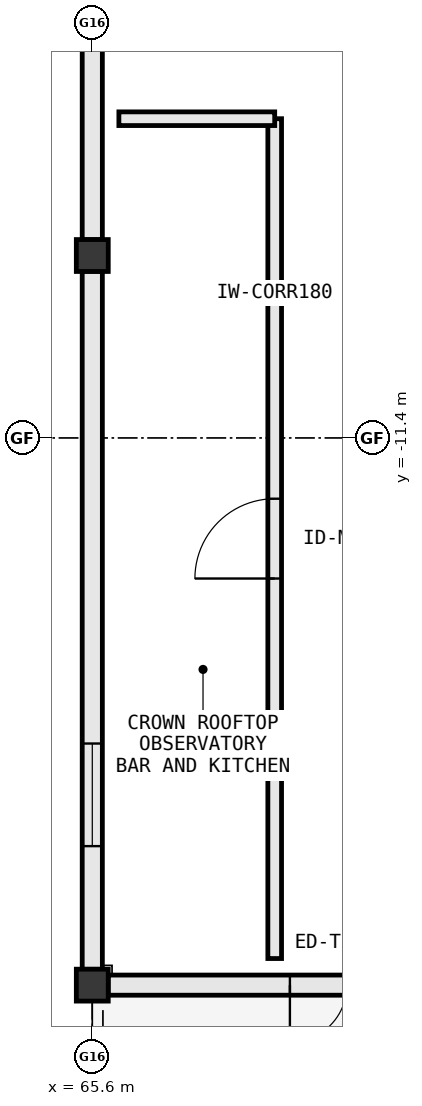
"""IFC4 building model, lengths in metres.
Left out: names, types, materials, properties, quantities, classifications, styles, units other than length and angle.
Written with IfcOpenShell. Run it as: python <this file> out.ifc"""

import sys

from ifc_helpers import new_model, si_unit, direction, frame, frame_2d, origin, origin_2d, place, context, subcontext, project, spatial, rectangle, extrude, element, fill, save


model = new_model("IFC4")
c1 = context("Model", 3, precision=1e-05, world=origin(), true_north=direction((0.0, 1.0)))
c2 = subcontext(c1, "Body", "Model", "MODEL_VIEW")
j1 = project(units=[si_unit("LENGTHUNIT", "METRE"), si_unit("PLANEANGLEUNIT", "RADIAN")], contexts=[c1])
p1 = place(None, origin())
s1 = spatial("IfcSite", under=j1, at=p1, CompositionType="ELEMENT")
p2 = place(p1, origin())
s2 = spatial("IfcBuilding", under=s1, at=p2, CompositionType="ELEMENT")
p3 = place(p2, frame((0.0, 0.0, 46.6)))
s3 = spatial("IfcBuildingStorey", under=s2, at=p3, CompositionType="ELEMENT", Elevation=46.6)
for number, where, z_axis, x_axis in (
    (1, (65.6, -18.6, 0.0), (0.0, 0.0, 1.0), (1.0, 0.0, 0.0)),
    (2, (65.6, -9.0, 0.0), (0.0, 0.0, 1.0), (1.0, 0.0, 0.0)),
):
    element("IfcColumn", number, at=place(p3, frame(where, z_axis=z_axis, x_axis=x_axis)), inside=s3, PredefinedType="COLUMN", context=c2, shape_type="SweptSolid", body=[
        extrude(rectangle(XDim=0.42, YDim=0.42, at=origin_2d()), origin(), (0.0, 0.0, 1.0), 4.2),
    ])
p4 = place(p3, frame((65.808, -18.6, 0.0), z_axis=(0.0, 0.0, 1.0), x_axis=(1.0, 0.0, 0.0)))
e3 = element("IfcWall", 3, at=p4, inside=s3, PredefinedType="STANDARD", context=c2, shape_type="SweptSolid", body=[
    extrude(rectangle(XDim=8.814, YDim=0.265, at=frame_2d((4.407, 0.0))), origin(), (0.0, 0.0, 1.0), 3.99),
])
p5 = place(p4, frame((2.392, 0.0, 0.0)))
e4 = element("IfcOpeningElement", 4, at=p5, cuts=e3, PredefinedType="OPENING", context=c2, shape_type="SweptSolid", body=[
    extrude(rectangle(XDim=1.5, YDim=2.22, at=frame_2d((0.75, 1.11))), frame((0.0, 0.145, 0.0), z_axis=(0.0, -1.0, 0.0), x_axis=(1.0, 0.0, 0.0)), (0.0, 0.0, 1.0), 0.289),
])
p6 = place(p3, frame((65.6, 0.392, 0.0), z_axis=(0.0, 0.0, 1.0), x_axis=(0.0, -1.0, 0.0)))
e5 = element("IfcWall", 5, at=p6, inside=s3, PredefinedType="STANDARD", context=c2, shape_type="SweptSolid", body=[
    extrude(rectangle(XDim=9.184, YDim=0.265, at=frame_2d((4.592, 0.0))), origin(), (0.0, 0.0, 1.0), 3.99),
])
p7 = place(p6, frame((1.621, 0.0, 0.85)))
e6 = element("IfcOpeningElement", 6, at=p7, cuts=e5, PredefinedType="OPENING", context=c2, shape_type="SweptSolid", body=[
    extrude(rectangle(XDim=1.35, YDim=1.65, at=frame_2d((0.675, 0.825))), frame((0.0, 0.145, 0.0), z_axis=(0.0, -1.0, 0.0), x_axis=(1.0, 0.0, 0.0)), (0.0, 0.0, 1.0), 0.289),
])
p8 = place(p3, frame((65.6, -9.208, 0.0), z_axis=(0.0, 0.0, 1.0), x_axis=(0.0, -1.0, 0.0)))
e7 = element("IfcWall", 7, at=p8, inside=s3, PredefinedType="STANDARD", context=c2, shape_type="SweptSolid", body=[
    extrude(rectangle(XDim=9.184, YDim=0.265, at=frame_2d((4.592, 0.0))), origin(), (0.0, 0.0, 1.0), 3.99),
])
p9 = place(p8, frame((6.213, 0.0, 0.85)))
e8 = element("IfcOpeningElement", 8, at=p9, cuts=e7, PredefinedType="OPENING", context=c2, shape_type="SweptSolid", body=[
    extrude(rectangle(XDim=1.35, YDim=1.65, at=frame_2d((0.675, 0.825))), frame((0.0, 0.145, 0.0), z_axis=(0.0, -1.0, 0.0), x_axis=(1.0, 0.0, 0.0)), (0.0, 0.0, 1.0), 0.289),
])
p10 = place(p3, frame((68.0, -18.25, 0.0), z_axis=(0.0, 0.0, 1.0), x_axis=(0.0, 1.0, 0.0)))
e9 = element("IfcWall", 9, at=p10, inside=s3, PredefinedType="PARTITIONING", context=c2, shape_type="SweptSolid", body=[
    extrude(rectangle(XDim=11.05, YDim=0.18, at=frame_2d((5.525, 0.0))), origin(), (0.0, 0.0, 1.0), 3.99),
])
p11 = place(p10, frame((5.0, 0.0, 0.0)))
e10 = element("IfcOpeningElement", 10, at=p11, cuts=e9, PredefinedType="OPENING", context=c2, shape_type="SweptSolid", body=[
    extrude(rectangle(XDim=1.05, YDim=2.2, at=frame_2d((0.525, 1.1))), frame((0.0, 0.102, 0.0), z_axis=(0.0, -1.0, 0.0), x_axis=(1.0, 0.0, 0.0)), (0.0, 0.0, 1.0), 0.204),
])
p12 = place(p3, frame((68.0, -7.2, 0.0), z_axis=(0.0, 0.0, 1.0), x_axis=(-1.0, 0.0, 0.0)))
e11 = element("IfcWall", 11, at=p12, inside=s3, PredefinedType="PARTITIONING", context=c2, shape_type="SweptSolid", body=[
    extrude(rectangle(XDim=2.05, YDim=0.18, at=frame_2d((1.025, 0.0))), origin(), (0.0, 0.0, 1.0), 3.99),
])
p13 = place(p5, frame((1.5, 0.0, 0.0), z_axis=(0.0, 0.0, 1.0), x_axis=(-1.0, 0.0, 0.0)))
e12 = element("IfcDoor", 12, at=p13, inside=s3, OperationType="DOUBLE_DOOR_SINGLE_SWING", PredefinedType="DOOR", context=c2, shape_type="SweptSolid", body=[
    extrude(rectangle(XDim=1.5, YDim=2.22, at=frame_2d((0.75, 1.11))), frame((0.0, 0.025, 0.0), z_axis=(0.0, -1.0, 0.0), x_axis=(1.0, 0.0, 0.0)), (0.0, 0.0, 1.0), 0.05),
])
fill(e4, e12)
p14 = place(p9, origin())
e13 = element("IfcWindow", 13, at=p14, inside=s3, PartitioningType="SINGLE_PANEL", PredefinedType="WINDOW", context=c2, shape_type="SweptSolid", body=[
    extrude(rectangle(XDim=1.35, YDim=1.65, at=frame_2d((0.675, 0.825))), frame((0.0, 0.03, 0.0), z_axis=(0.0, -1.0, 0.0), x_axis=(1.0, 0.0, 0.0)), (0.0, 0.0, 1.0), 0.06),
])
fill(e8, e13)
p15 = place(p11, origin())
e14 = element("IfcDoor", 14, at=p15, inside=s3, OperationType="SINGLE_SWING_LEFT", PredefinedType="DOOR", context=c2, shape_type="SweptSolid", body=[
    extrude(rectangle(XDim=1.05, YDim=2.2, at=frame_2d((0.525, 1.1))), frame((0.0, 0.025, 0.0), z_axis=(0.0, -1.0, 0.0), x_axis=(1.0, 0.0, 0.0)), (0.0, 0.0, 1.0), 0.05),
])
fill(e10, e14)
save(model, sys.argv[1])
